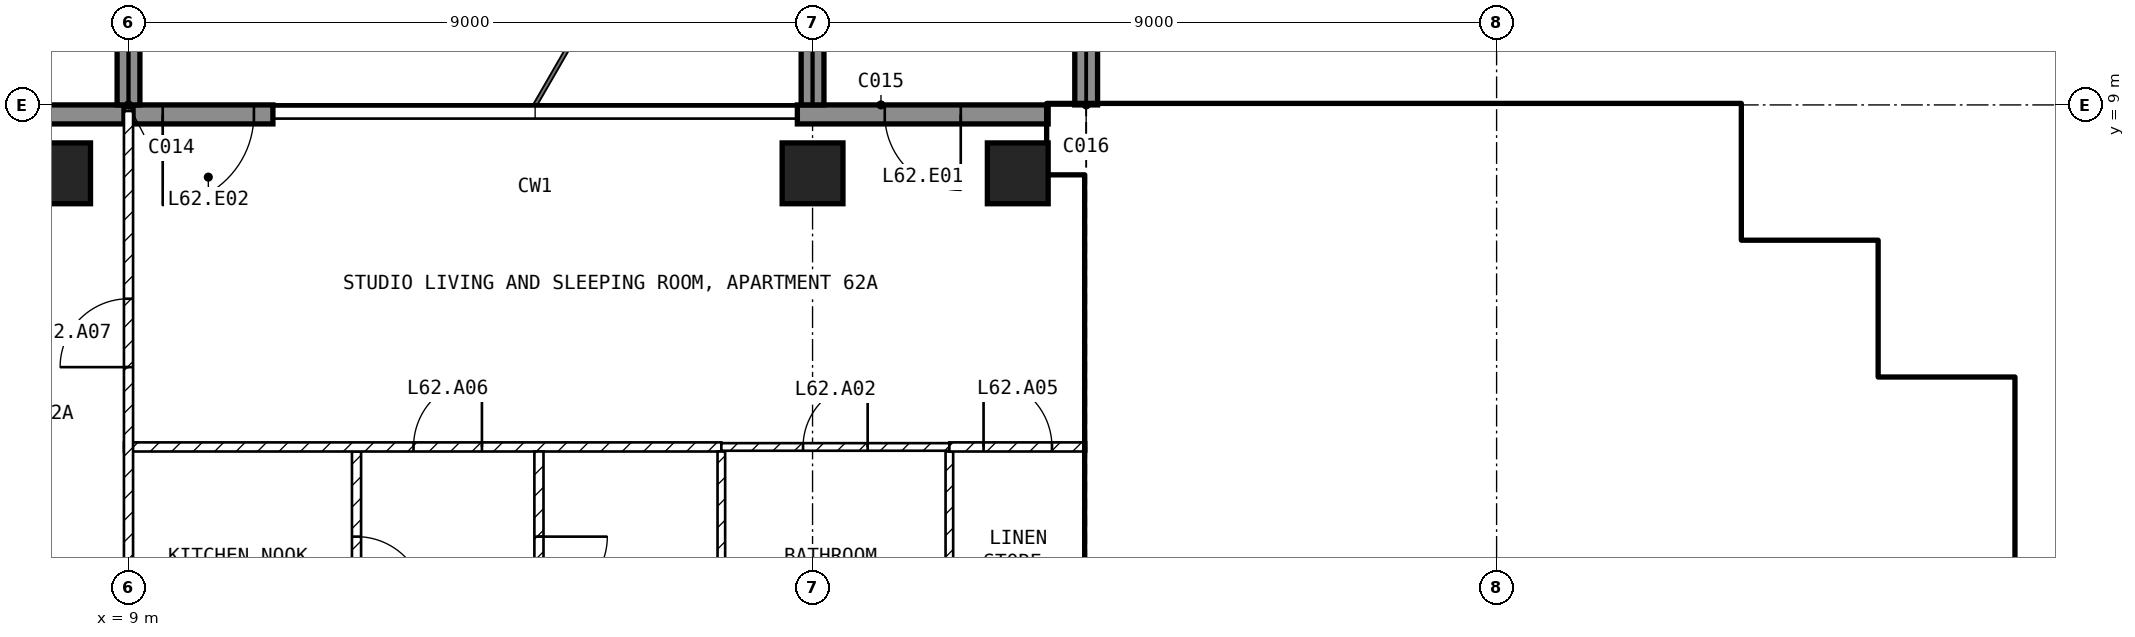
"""IFC4 building model, lengths in metres.
Left out: names, types, materials, properties, quantities, classifications, styles, units other than length and angle.
Written with IfcOpenShell. Run it as: python <this file> out.ifc"""

import sys

from ifc_helpers import new_model, si_unit, direction, frame, frame_2d, origin, origin_2d, place, context, subcontext, project, spatial, rectangle, extrude, element, fill, save


model = new_model("IFC4")
c1 = context("Model", 3, precision=1e-05, world=origin(), true_north=direction((0.0, 1.0)))
c2 = subcontext(c1, "Body", "Model", "MODEL_VIEW")
j1 = project(units=[si_unit("LENGTHUNIT", "METRE"), si_unit("PLANEANGLEUNIT", "RADIAN")], contexts=[c1])
p1 = place(None, origin())
s1 = spatial("IfcSite", under=j1, at=p1, CompositionType="ELEMENT")
p2 = place(p1, origin())
s2 = spatial("IfcBuilding", under=s1, at=p2, CompositionType="ELEMENT")
p3 = place(p2, frame((0.0, 0.0, 246.5)))
s3 = spatial("IfcBuildingStorey", under=s2, at=p3, CompositionType="ELEMENT", Elevation=246.5)
for number, where, z_axis, x_axis in (
    (1, (8.1, 8.1, -0.25), (0.0, 0.0, 1.0), (1.0, 0.0, 0.0)),
    (2, (18.0, 8.1, -0.25), (0.0, 0.0, 1.0), (1.0, 0.0, 0.0)),
    (3, (20.7, 8.1, -0.25), (0.0, 0.0, 1.0), (1.0, 0.0, 0.0)),
):
    element("IfcColumn", number, at=place(p3, frame(where, z_axis=z_axis, x_axis=x_axis)), inside=s3, PredefinedType="COLUMN", context=c2, shape_type="SweptSolid", body=[
        extrude(rectangle(XDim=0.8, YDim=0.8, at=origin_2d()), origin(), (0.0, 0.0, 1.0), 3.5),
    ])
p4 = place(p3, frame((21.1, 8.875, 0.0), z_axis=(0.0, 0.0, 1.0), x_axis=(-1.0, 0.0, 0.0)))
e4 = element("IfcWall", 4, at=p4, inside=s3, PredefinedType="SOLIDWALL", context=c2, shape_type="SweptSolid", body=[
    extrude(rectangle(XDim=3.3, YDim=0.25, at=frame_2d((1.65, 0.0))), origin(), (0.0, 0.0, 1.0), 3.25),
])
p5 = place(p4, frame((1.15, 0.0, 0.0)))
e5 = element("IfcOpeningElement", 5, at=p5, cuts=e4, PredefinedType="OPENING", context=c2, shape_type="SweptSolid", body=[
    extrude(rectangle(XDim=1.0, YDim=2.4, at=frame_2d((0.5, 1.2))), frame((0.0, 0.135, 0.0), z_axis=(0.0, -1.0, 0.0), x_axis=(1.0, 0.0, 0.0)), (0.0, 0.0, 1.0), 0.27),
])
p6 = place(p3, frame((10.9, 8.875, 0.0), z_axis=(0.0, 0.0, 1.0), x_axis=(-1.0, 0.0, 0.0)))
e6 = element("IfcWall", 6, at=p6, inside=s3, PredefinedType="SOLIDWALL", context=c2, shape_type="SweptSolid", body=[
    extrude(rectangle(XDim=1.84, YDim=0.25, at=frame_2d((0.92, 0.0))), origin(), (0.0, 0.0, 1.0), 3.25),
])
p7 = place(p6, frame((0.25, 0.0, 0.0)))
e7 = element("IfcOpeningElement", 7, at=p7, cuts=e6, PredefinedType="OPENING", context=c2, shape_type="SweptSolid", body=[
    extrude(rectangle(XDim=1.2, YDim=2.4, at=frame_2d((0.6, 1.2))), frame((0.0, 0.135, 0.0), z_axis=(0.0, -1.0, 0.0), x_axis=(1.0, 0.0, 0.0)), (0.0, 0.0, 1.0), 0.27),
])
p8 = place(p3, frame((8.94, 8.875, 0.0), z_axis=(0.0, 0.0, 1.0), x_axis=(-1.0, 0.0, 0.0)))
e8 = element("IfcWall", 8, at=p8, inside=s3, PredefinedType="SOLIDWALL", context=c2, shape_type="SweptSolid", body=[
    extrude(rectangle(XDim=3.04, YDim=0.25, at=frame_2d((1.52, 0.0))), origin(), (0.0, 0.0, 1.0), 3.25),
])
p9 = place(p8, frame((1.59, 0.0, 0.0)))
e9 = element("IfcOpeningElement", 9, at=p9, cuts=e8, PredefinedType="OPENING", context=c2, shape_type="SweptSolid", body=[
    extrude(rectangle(XDim=1.2, YDim=2.4, at=frame_2d((0.6, 1.2))), frame((0.0, 0.135, 0.0), z_axis=(0.0, -1.0, 0.0), x_axis=(1.0, 0.0, 0.0)), (0.0, 0.0, 1.0), 0.27),
])
for number, where, z_axis, x_axis in (
    (10, (9.0, 9.0, 0.0), (0.0, 0.0, 1.0), (0.0, 1.0, 0.0)),
    (11, (18.0, 9.0, 0.0), (0.0, 0.0, 1.0), (0.0, 1.0, 0.0)),
    (12, (21.6, 9.0, 0.0), (0.0, 0.0, 1.0), (0.0, 1.0, 0.0)),
):
    element("IfcWall", number, at=place(p3, frame(where, z_axis=z_axis, x_axis=x_axis)), inside=s3, PredefinedType="SOLIDWALL", context=c2, shape_type="SweptSolid", body=[
        extrude(rectangle(XDim=2.7, YDim=0.3, at=frame_2d((1.35, 0.0))), origin(), (0.0, 0.0, 1.0), 3.25),
    ])
p10 = place(p3, frame((33.575, -4.95, 0.0), z_axis=(0.0, 0.0, 1.0), x_axis=(0.0, 1.0, 0.0)))
e13 = element("IfcWall", 13, at=p10, inside=s3, PredefinedType="SHEAR", context=c2, shape_type="SweptSolid", body=[
    extrude(rectangle(XDim=10.35, YDim=0.45, at=frame_2d((5.175, 0.0))), origin(), (0.0, 0.0, 1.0), 3.25),
])
for number, where, z_axis, x_axis in (
    (14, (31.55, 5.175, 0.0), (0.0, 0.0, 1.0), (1.0, 0.0, 0.0)),
    (15, (31.775, 5.4, 0.0), (0.0, 0.0, 1.0), (0.0, 1.0, 0.0)),
    (16, (29.75, 6.975, 0.0), (0.0, 0.0, 1.0), (1.0, 0.0, 0.0)),
    (17, (29.975, 7.2, 0.0), (0.0, 0.0, 1.0), (0.0, 1.0, 0.0)),
):
    element("IfcWall", number, at=place(p3, frame(where, z_axis=z_axis, x_axis=x_axis)), inside=s3, PredefinedType="SHEAR", context=c2, shape_type="SweptSolid", body=[
        extrude(rectangle(XDim=1.8, YDim=0.45, at=frame_2d((0.9, 0.0))), origin(), (0.0, 0.0, 1.0), 3.25),
    ])
p11 = place(p3, frame((21.1, 8.55, 0.0), z_axis=(0.0, 0.0, 1.0), x_axis=(1.0, 0.0, 0.0)))
e18 = element("IfcWall", 18, at=p11, inside=s3, PredefinedType="SHEAR", context=c2, shape_type="SweptSolid", body=[
    extrude(rectangle(XDim=8.65, YDim=0.9, at=frame_2d((4.325, 0.0))), origin(), (0.0, 0.0, 1.0), 3.25),
])
p12 = place(p3, frame((21.825, 1.2, 0.0), z_axis=(0.0, 0.0, 1.0), x_axis=(0.0, 1.0, 0.0)))
e19 = element("IfcWall", 19, at=p12, inside=s3, PredefinedType="SHEAR", context=c2, shape_type="SweptSolid", body=[
    extrude(rectangle(XDim=6.9, YDim=0.45, at=frame_2d((3.45, 0.0))), origin(), (0.0, 0.0, 1.0), 3.25),
])
p13 = place(p3, frame((22.05, 5.15, 0.0), z_axis=(0.0, 0.0, 1.0), x_axis=(1.0, 0.0, 0.0)))
e20 = element("IfcWall", 20, at=p13, inside=s3, PredefinedType="SOLIDWALL", context=c2, shape_type="SweptSolid", body=[
    extrude(rectangle(XDim=6.3, YDim=0.2, at=frame_2d((3.15, 0.0))), origin(), (0.0, 0.0, 1.0), 3.25),
])
p14 = place(p13, frame((0.2, 0.0, 0.0)))
e21 = element("IfcOpeningElement", 21, at=p14, cuts=e20, PredefinedType="OPENING", context=c2, shape_type="SweptSolid", body=[
    extrude(rectangle(XDim=1.0, YDim=2.1, at=frame_2d((0.5, 1.05))), frame((0.0, 0.11, 0.0), z_axis=(0.0, -1.0, 0.0), x_axis=(1.0, 0.0, 0.0)), (0.0, 0.0, 1.0), 0.22),
])
p15 = place(p3, frame((28.25, 5.25, 0.0), z_axis=(0.0, 0.0, 1.0), x_axis=(0.0, 1.0, 0.0)))
e22 = element("IfcWall", 22, at=p15, inside=s3, PredefinedType="SOLIDWALL", context=c2, shape_type="SweptSolid", body=[
    extrude(rectangle(XDim=2.85, YDim=0.2, at=frame_2d((1.425, 0.0))), origin(), (0.0, 0.0, 1.0), 3.25),
])
p16 = place(p3, frame((27.2, 3.95, 0.0), z_axis=(0.0, 0.0, 1.0), x_axis=(1.0, 0.0, 0.0)))
e23 = element("IfcWall", 23, at=p16, inside=s3, PredefinedType="SOLIDWALL", context=c2, shape_type="SweptSolid", body=[
    extrude(rectangle(XDim=6.15, YDim=0.2, at=frame_2d((3.075, 0.0))), origin(), (0.0, 0.0, 1.0), 3.25),
])
p17 = place(p3, frame((27.1, 1.55, 0.0), z_axis=(0.0, 0.0, 1.0), x_axis=(0.0, 1.0, 0.0)))
e24 = element("IfcWall", 24, at=p17, inside=s3, PredefinedType="SOLIDWALL", context=c2, shape_type="SweptSolid", body=[
    extrude(rectangle(XDim=3.5, YDim=0.2, at=frame_2d((1.75, 0.0))), origin(), (0.0, 0.0, 1.0), 3.25),
])
p18 = place(p17, frame((0.6, 0.0, 0.0)))
e25 = element("IfcOpeningElement", 25, at=p18, cuts=e24, PredefinedType="OPENING", context=c2, shape_type="SweptSolid", body=[
    extrude(rectangle(XDim=1.1, YDim=2.1, at=frame_2d((0.55, 1.05))), frame((0.0, 0.11, 0.0), z_axis=(0.0, -1.0, 0.0), x_axis=(1.0, 0.0, 0.0)), (0.0, 0.0, 1.0), 0.22),
])
p19 = place(p17, frame((2.6, 0.0, 0.0)))
e26 = element("IfcOpeningElement", 26, at=p19, cuts=e24, PredefinedType="OPENING", context=c2, shape_type="SweptSolid", body=[
    extrude(rectangle(XDim=0.8, YDim=2.1, at=frame_2d((0.4, 1.05))), frame((0.0, 0.11, 0.0), z_axis=(0.0, -1.0, 0.0), x_axis=(1.0, 0.0, 0.0)), (0.0, 0.0, 1.0), 0.22),
])
p20 = place(p3, frame((30.0, 1.55, 0.0), z_axis=(0.0, 0.0, 1.0), x_axis=(0.0, 1.0, 0.0)))
e27 = element("IfcWall", 27, at=p20, inside=s3, PredefinedType="SOLIDWALL", context=c2, shape_type="SweptSolid", body=[
    extrude(rectangle(XDim=2.3, YDim=0.2, at=frame_2d((1.15, 0.0))), origin(), (0.0, 0.0, 1.0), 3.25),
])
p21 = place(p3, frame((12.0, 4.44, 0.0), z_axis=(0.0, 0.0, 1.0), x_axis=(0.0, -1.0, 0.0)))
e28 = element("IfcWall", 28, at=p21, inside=s3, PredefinedType="PARTITIONING", context=c2, shape_type="SweptSolid", body=[
    extrude(rectangle(XDim=3.14, YDim=0.12, at=frame_2d((1.57, 0.0))), origin(), (0.0, 0.0, 1.0), 3.25),
])
p22 = place(p21, frame((1.12, 0.0, 0.0)))
e29 = element("IfcOpeningElement", 29, at=p22, cuts=e28, PredefinedType="OPENING", context=c2, shape_type="SweptSolid", body=[
    extrude(rectangle(XDim=0.9, YDim=2.1, at=frame_2d((0.45, 1.05))), frame((0.0, 0.07, 0.0), z_axis=(0.0, -1.0, 0.0), x_axis=(1.0, 0.0, 0.0)), (0.0, 0.0, 1.0), 0.14),
])
p23 = place(p3, frame((8.94, 4.5, 0.0), z_axis=(0.0, 0.0, 1.0), x_axis=(1.0, 0.0, 0.0)))
e30 = element("IfcWall", 30, at=p23, inside=s3, PredefinedType="PARTITIONING", context=c2, shape_type="SweptSolid", body=[
    extrude(rectangle(XDim=7.86, YDim=0.12, at=frame_2d((3.93, 0.0))), origin(), (0.0, 0.0, 1.0), 3.25),
])
p24 = place(p23, frame((3.81, 0.0, 0.0)))
e31 = element("IfcOpeningElement", 31, at=p24, cuts=e30, PredefinedType="OPENING", context=c2, shape_type="SweptSolid", body=[
    extrude(rectangle(XDim=0.9, YDim=2.1, at=frame_2d((0.45, 1.05))), frame((0.0, 0.07, 0.0), z_axis=(0.0, -1.0, 0.0), x_axis=(1.0, 0.0, 0.0)), (0.0, 0.0, 1.0), 0.14),
])
p25 = place(p3, frame((9.0, 1.3, 0.0), z_axis=(0.0, 0.0, 1.0), x_axis=(0.0, 1.0, 0.0)))
e32 = element("IfcWall", 32, at=p25, inside=s3, PredefinedType="PARTITIONING", context=c2, shape_type="SweptSolid", body=[
    extrude(rectangle(XDim=7.62, YDim=0.12, at=frame_2d((3.81, 0.0))), origin(), (0.0, 0.0, 1.0), 3.25),
])
p26 = place(p25, frame((4.25, 0.0, 0.0)))
e33 = element("IfcOpeningElement", 33, at=p26, cuts=e32, PredefinedType="OPENING", context=c2, shape_type="SweptSolid", body=[
    extrude(rectangle(XDim=0.9, YDim=2.1, at=frame_2d((0.45, 1.05))), frame((0.0, 0.07, 0.0), z_axis=(0.0, -1.0, 0.0), x_axis=(1.0, 0.0, 0.0)), (0.0, 0.0, 1.0), 0.14),
])
p27 = place(p3, frame((14.4, 4.44, 0.0), z_axis=(0.0, 0.0, 1.0), x_axis=(0.0, -1.0, 0.0)))
e34 = element("IfcWall", 34, at=p27, inside=s3, PredefinedType="PARTITIONING", context=c2, shape_type="SweptSolid", body=[
    extrude(rectangle(XDim=3.14, YDim=0.12, at=frame_2d((1.57, 0.0))), origin(), (0.0, 0.0, 1.0), 3.25),
])
p28 = place(p27, frame((1.12, 0.0, 0.0)))
e35 = element("IfcOpeningElement", 35, at=p28, cuts=e34, PredefinedType="OPENING", context=c2, shape_type="SweptSolid", body=[
    extrude(rectangle(XDim=0.9, YDim=2.1, at=frame_2d((0.45, 1.05))), frame((0.0, 0.07, 0.0), z_axis=(0.0, -1.0, 0.0), x_axis=(1.0, 0.0, 0.0)), (0.0, 0.0, 1.0), 0.14),
])
for number, where, z_axis, x_axis in (
    (36, (16.8, 4.44, 0.0), (0.0, 0.0, 1.0), (0.0, -1.0, 0.0)),
    (37, (19.8, 4.44, 0.0), (0.0, 0.0, 1.0), (0.0, -1.0, 0.0)),
):
    element("IfcWall", number, at=place(p3, frame(where, z_axis=z_axis, x_axis=x_axis)), inside=s3, PredefinedType="PARTITIONING", context=c2, shape_type="SweptSolid", body=[
        extrude(rectangle(XDim=3.14, YDim=0.1, at=frame_2d((1.57, 0.0))), origin(), (0.0, 0.0, 1.0), 3.25),
    ])
p29 = place(p3, frame((16.8, 4.5, 0.0), z_axis=(0.0, 0.0, 1.0), x_axis=(1.0, 0.0, 0.0)))
e38 = element("IfcWall", 38, at=p29, inside=s3, PredefinedType="PARTITIONING", context=c2, shape_type="SweptSolid", body=[
    extrude(rectangle(XDim=3.0, YDim=0.1, at=frame_2d((1.5, 0.0))), origin(), (0.0, 0.0, 1.0), 3.25),
])
p30 = place(p29, frame((1.075, 0.0, 0.0)))
e39 = element("IfcOpeningElement", 39, at=p30, cuts=e38, PredefinedType="OPENING", context=c2, shape_type="SweptSolid", body=[
    extrude(rectangle(XDim=0.85, YDim=2.1, at=frame_2d((0.425, 1.05))), frame((0.0, 0.06, 0.0), z_axis=(0.0, -1.0, 0.0), x_axis=(1.0, 0.0, 0.0)), (0.0, 0.0, 1.0), 0.12),
])
p31 = place(p3, frame((19.8, 4.5, 0.0), z_axis=(0.0, 0.0, 1.0), x_axis=(1.0, 0.0, 0.0)))
e40 = element("IfcWall", 40, at=p31, inside=s3, PredefinedType="PARTITIONING", context=c2, shape_type="SweptSolid", body=[
    extrude(rectangle(XDim=1.8, YDim=0.12, at=frame_2d((0.9, 0.0))), origin(), (0.0, 0.0, 1.0), 3.25),
])
p32 = place(p31, frame((0.45, 0.0, 0.0)))
e41 = element("IfcOpeningElement", 41, at=p32, cuts=e40, PredefinedType="OPENING", context=c2, shape_type="SweptSolid", body=[
    extrude(rectangle(XDim=0.9, YDim=2.1, at=frame_2d((0.45, 1.05))), frame((0.0, 0.07, 0.0), z_axis=(0.0, -1.0, 0.0), x_axis=(1.0, 0.0, 0.0)), (0.0, 0.0, 1.0), 0.14),
])
p33 = place(p5, origin())
e42 = element("IfcDoor", 42, at=p33, inside=s3, OperationType="SINGLE_SWING_LEFT", PredefinedType="DOOR", context=c2, shape_type="SweptSolid", body=[
    extrude(rectangle(XDim=1.0, YDim=2.4, at=frame_2d((0.5, 1.2))), frame((0.0, 0.025, 0.0), z_axis=(0.0, -1.0, 0.0), x_axis=(1.0, 0.0, 0.0)), (0.0, 0.0, 1.0), 0.05),
])
fill(e5, e42)
p34 = place(p7, origin())
e43 = element("IfcDoor", 43, at=p34, inside=s3, OperationType="SINGLE_SWING_RIGHT", PredefinedType="DOOR", context=c2, shape_type="SweptSolid", body=[
    extrude(rectangle(XDim=1.2, YDim=2.4, at=frame_2d((0.6, 1.2))), frame((0.0, 0.025, 0.0), z_axis=(0.0, -1.0, 0.0), x_axis=(1.0, 0.0, 0.0)), (0.0, 0.0, 1.0), 0.05),
])
fill(e7, e43)
p35 = place(p18, origin())
e44 = element("IfcDoor", 44, at=p35, inside=s3, OperationType="DOUBLE_DOOR_SLIDING", PredefinedType="DOOR", context=c2, shape_type="SweptSolid", body=[
    extrude(rectangle(XDim=1.1, YDim=2.1, at=frame_2d((0.55, 1.05))), frame((0.0, 0.025, 0.0), z_axis=(0.0, -1.0, 0.0), x_axis=(1.0, 0.0, 0.0)), (0.0, 0.0, 1.0), 0.05),
])
fill(e25, e44)
p36 = place(p14, origin())
e45 = element("IfcDoor", 45, at=p36, inside=s3, OperationType="SINGLE_SWING_LEFT", PredefinedType="DOOR", context=c2, shape_type="SweptSolid", body=[
    extrude(rectangle(XDim=1.0, YDim=2.1, at=frame_2d((0.5, 1.05))), frame((0.0, 0.025, 0.0), z_axis=(0.0, -1.0, 0.0), x_axis=(1.0, 0.0, 0.0)), (0.0, 0.0, 1.0), 0.05),
])
fill(e21, e45)
p37 = place(p19, origin())
e46 = element("IfcDoor", 46, at=p37, inside=s3, OperationType="SINGLE_SWING_LEFT", PredefinedType="DOOR", context=c2, shape_type="SweptSolid", body=[
    extrude(rectangle(XDim=0.8, YDim=2.1, at=frame_2d((0.4, 1.05))), frame((0.0, 0.025, 0.0), z_axis=(0.0, -1.0, 0.0), x_axis=(1.0, 0.0, 0.0)), (0.0, 0.0, 1.0), 0.05),
])
fill(e26, e46)
p38 = place(p30, origin())
e47 = element("IfcDoor", 47, at=p38, inside=s3, OperationType="SINGLE_SWING_RIGHT", PredefinedType="DOOR", context=c2, shape_type="SweptSolid", body=[
    extrude(rectangle(XDim=0.85, YDim=2.1, at=frame_2d((0.425, 1.05))), frame((0.0, 0.025, 0.0), z_axis=(0.0, -1.0, 0.0), x_axis=(1.0, 0.0, 0.0)), (0.0, 0.0, 1.0), 0.05),
])
fill(e39, e47)
p39 = place(p22, origin())
e48 = element("IfcDoor", 48, at=p39, inside=s3, OperationType="SINGLE_SWING_RIGHT", PredefinedType="DOOR", context=c2, shape_type="SweptSolid", body=[
    extrude(rectangle(XDim=0.9, YDim=2.1, at=frame_2d((0.45, 1.05))), frame((0.0, 0.025, 0.0), z_axis=(0.0, -1.0, 0.0), x_axis=(1.0, 0.0, 0.0)), (0.0, 0.0, 1.0), 0.05),
])
fill(e29, e48)
p40 = place(p32, origin())
e49 = element("IfcDoor", 49, at=p40, inside=s3, OperationType="SINGLE_SWING_LEFT", PredefinedType="DOOR", context=c2, shape_type="SweptSolid", body=[
    extrude(rectangle(XDim=0.9, YDim=2.1, at=frame_2d((0.45, 1.05))), frame((0.0, 0.025, 0.0), z_axis=(0.0, -1.0, 0.0), x_axis=(1.0, 0.0, 0.0)), (0.0, 0.0, 1.0), 0.05),
])
fill(e41, e49)
p41 = place(p24, origin())
e50 = element("IfcDoor", 50, at=p41, inside=s3, OperationType="SINGLE_SWING_RIGHT", PredefinedType="DOOR", context=c2, shape_type="SweptSolid", body=[
    extrude(rectangle(XDim=0.9, YDim=2.1, at=frame_2d((0.45, 1.05))), frame((0.0, 0.025, 0.0), z_axis=(0.0, -1.0, 0.0), x_axis=(1.0, 0.0, 0.0)), (0.0, 0.0, 1.0), 0.05),
])
fill(e31, e50)
p42 = place(p26, origin())
e51 = element("IfcDoor", 51, at=p42, inside=s3, OperationType="SINGLE_SWING_LEFT", PredefinedType="DOOR", context=c2, shape_type="SweptSolid", body=[
    extrude(rectangle(XDim=0.9, YDim=2.1, at=frame_2d((0.45, 1.05))), frame((0.0, 0.025, 0.0), z_axis=(0.0, -1.0, 0.0), x_axis=(1.0, 0.0, 0.0)), (0.0, 0.0, 1.0), 0.05),
])
fill(e33, e51)
p43 = place(p28, origin())
e52 = element("IfcDoor", 52, at=p43, inside=s3, OperationType="SINGLE_SWING_LEFT", PredefinedType="DOOR", context=c2, shape_type="SweptSolid", body=[
    extrude(rectangle(XDim=0.9, YDim=2.1, at=frame_2d((0.45, 1.05))), frame((0.0, 0.025, 0.0), z_axis=(0.0, -1.0, 0.0), x_axis=(1.0, 0.0, 0.0)), (0.0, 0.0, 1.0), 0.05),
])
fill(e35, e52)
save(model, sys.argv[1])
